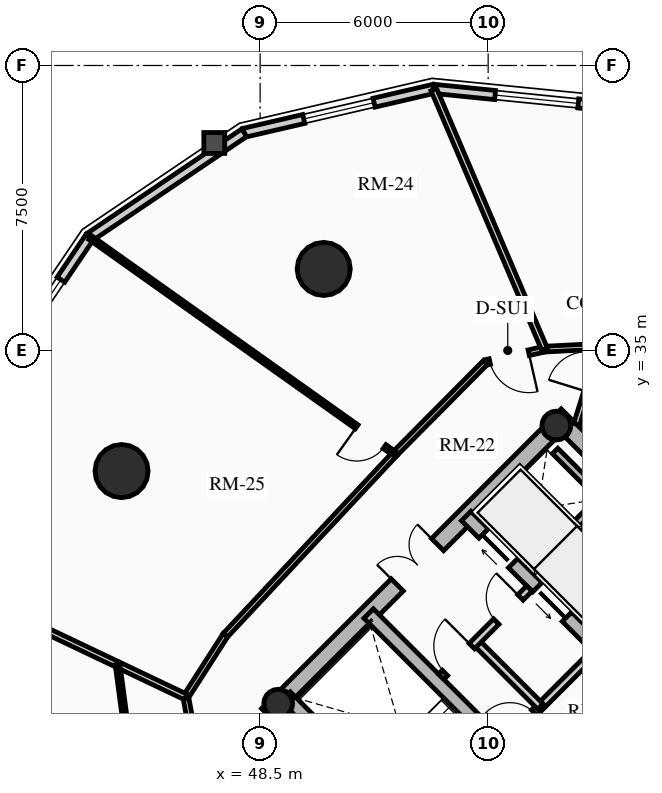
"""IFC4 building model, lengths in metres.
Left out: names, types, materials, properties, quantities, classifications, styles, units other than length and angle.
Written with IfcOpenShell. Run it as: python <this file> out.ifc"""

import sys

from ifc_helpers import new_model, si_unit, direction, frame, frame_2d, origin, origin_2d, place, context, subcontext, project, spatial, rectangle, circle, hollow_circle, extrude, source, transform, mapped, element, fill, save


model = new_model("IFC4")
c1 = context("Model", 3, precision=1e-05, world=origin(), true_north=direction((0.0, 1.0)))
c2 = subcontext(c1, "Body", "Model", "MODEL_VIEW")
j1 = project(units=[si_unit("LENGTHUNIT", "METRE"), si_unit("PLANEANGLEUNIT", "RADIAN")], contexts=[c1])
p1 = place(None, origin())
s1 = spatial("IfcSite", under=j1, at=p1, CompositionType="ELEMENT")
p2 = place(p1, origin())
s2 = spatial("IfcBuilding", under=s1, at=p2, CompositionType="ELEMENT")
p3 = place(p2, frame((0.0, 0.0, 116.71)))
s3 = spatial("IfcBuildingStorey", under=s2, at=p3, CompositionType="ELEMENT", Elevation=116.71)
for number, where, z_axis, x_axis in (
    (1, (58.737, 15.697, 0.0), (0.0, 0.0, 1.0), (-0.707, 0.707, 0.0)),
    (2, (66.303, 23.263, 0.0), (0.0, 0.0, 1.0), (-0.707, 0.707, 0.0)),
):
    element("IfcWall", number, at=place(p3, frame(where, z_axis=z_axis, x_axis=x_axis)), inside=s3, PredefinedType="SHEAR", context=c2, shape_type="SweptSolid", body=[
        extrude(rectangle(XDim=14.2, YDim=0.45, at=frame_2d((7.1, 0.0))), origin(), (0.0, 0.0, 1.0), 2.91),
    ])
p4 = place(p3, frame((48.856, 25.578, 0.0), z_axis=(0.0, 0.0, 1.0), x_axis=(0.707106781187, 0.707106781187, 0.0)))
e3 = element("IfcWall", 3, at=p4, inside=s3, PredefinedType="SHEAR", context=c2, shape_type="SweptSolid", body=[
    extrude(rectangle(XDim=10.7, YDim=0.45, at=frame_2d((5.35, 0.0))), origin(), (0.0, 0.0, 1.0), 2.91),
])
m1 = source(origin(), c2, "Body", "SweptSolid", [
    extrude(rectangle(XDim=1.5, YDim=2.02, at=frame_2d((0.75, 1.01))), frame((0.0, 0.235, 0.0), z_axis=(0.0, -1.0, 0.0), x_axis=(1.0, 0.0, 0.0)), (0.0, 0.0, 1.0), 0.47),
])
p5 = place(p4, frame((4.6, 0.0, 0.0)))
e4 = element("IfcOpeningElement", 4, at=p5, cuts=e3, PredefinedType="OPENING", context=c2, shape_type="MappedRepresentation", body=[
    mapped(m1, transform((0.0, 0.0, 0.0), x_axis=(1.0, 0.0, 0.0), y_axis=(0.0, 1.0, 0.0), z_axis=(0.0, 0.0, 1.0), scale=1.0)),
])
p6 = place(p3, frame((61.078, 18.355, 0.0), z_axis=(0.0, 0.0, 1.0), x_axis=(-0.707106781187, 0.707106781187, 0.0)))
e5 = element("IfcWall", 5, at=p6, inside=s3, PredefinedType="SHEAR", context=c2, shape_type="SweptSolid", body=[
    extrude(rectangle(XDim=13.75, YDim=0.35, at=frame_2d((6.875, 0.0))), origin(), (0.0, 0.0, 1.0), 2.91),
])
m2 = source(origin(), c2, "Body", "SweptSolid", [
    extrude(rectangle(XDim=1.1, YDim=2.015, at=frame_2d((0.55, 1.007))), frame((0.0, 0.185, 0.0), z_axis=(0.0, -1.0, 0.0), x_axis=(1.0, 0.0, 0.0)), (0.0, 0.0, 1.0), 0.37),
])
p7 = place(p6, frame((4.875, 0.0, 0.0)))
e6 = element("IfcOpeningElement", 6, at=p7, cuts=e5, PredefinedType="OPENING", context=c2, shape_type="MappedRepresentation", body=[
    mapped(m2, transform((0.0, 0.0, 0.0), x_axis=(1.0, 0.0, 0.0), y_axis=(0.0, 1.0, 0.0), z_axis=(0.0, 0.0, 1.0), scale=1.0)),
])
m3 = source(origin(), c2, "Body", "SweptSolid", [
    extrude(rectangle(XDim=1.15, YDim=2.02, at=frame_2d((0.575, 1.01))), frame((0.0, 0.185, 0.0), z_axis=(0.0, -1.0, 0.0), x_axis=(1.0, 0.0, 0.0)), (0.0, 0.0, 1.0), 0.37),
])
p8 = place(p6, frame((7.295, 0.0, 0.0)))
e7 = element("IfcOpeningElement", 7, at=p8, cuts=e5, PredefinedType="OPENING", context=c2, shape_type="MappedRepresentation", body=[
    mapped(m3, transform((0.0, 0.0, 0.0), x_axis=(1.0, 0.0, 0.0), y_axis=(0.0, 1.0, 0.0), z_axis=(0.0, 0.0, 1.0), scale=1.0)),
])
p9 = place(p3, frame((63.645, 20.922, 0.0), z_axis=(0.0, 0.0, 1.0), x_axis=(-0.707106781187, 0.707106781187, 0.0)))
e8 = element("IfcWall", 8, at=p9, inside=s3, PredefinedType="SHEAR", context=c2, shape_type="SweptSolid", body=[
    extrude(rectangle(XDim=13.75, YDim=0.35, at=frame_2d((6.875, 0.0))), origin(), (0.0, 0.0, 1.0), 2.91),
])
p10 = place(p9, frame((10.0, 0.0, 0.0)))
e9 = element("IfcOpeningElement", 9, at=p10, cuts=e8, PredefinedType="OPENING", context=c2, shape_type="MappedRepresentation", body=[
    mapped(m2, transform((0.0, 0.0, 0.0), x_axis=(1.0, 0.0, 0.0), y_axis=(0.0, 1.0, 0.0), z_axis=(0.0, 0.0, 1.0), scale=1.0)),
])
p11 = place(p9, frame((12.0, 0.0, 0.0)))
e10 = element("IfcOpeningElement", 10, at=p11, cuts=e8, PredefinedType="OPENING", context=c2, shape_type="MappedRepresentation", body=[
    mapped(m2, transform((0.0, 0.0, 0.0), x_axis=(1.0, 0.0, 0.0), y_axis=(0.0, 1.0, 0.0), z_axis=(0.0, 0.0, 1.0), scale=1.0)),
])
p12 = place(p9, frame((5.305, 0.0, 0.0)))
e11 = element("IfcOpeningElement", 11, at=p12, cuts=e8, PredefinedType="OPENING", context=c2, shape_type="MappedRepresentation", body=[
    mapped(m3, transform((0.0, 0.0, 0.0), x_axis=(1.0, 0.0, 0.0), y_axis=(0.0, 1.0, 0.0), z_axis=(0.0, 0.0, 1.0), scale=1.0)),
])
p13 = place(p3, frame((53.922, 21.141, 0.0), z_axis=(0.0, 0.0, 1.0), x_axis=(-0.707088616009, 0.707124945897, 0.0)))
e12 = element("IfcWall", 12, at=p13, inside=s3, PredefinedType="SHEAR", context=c2, shape_type="SweptSolid", body=[
    extrude(rectangle(XDim=6.72, YDim=0.35, at=frame_2d((3.36, 0.0))), origin(), (0.0, 0.0, 1.0), 2.91),
])
for number, where, z_axis, x_axis in (
    (13, (48.976, 25.706, 0.0), (0.0, 0.0, 1.0), (0.707, 0.707, 0.0)),
    (14, (56.294, 33.024, 0.0), (0.0, 0.0, 1.0), (0.707, 0.707, 0.0)),
):
    element("IfcColumn", number, at=place(p3, frame(where, z_axis=z_axis, x_axis=x_axis)), inside=s3, PredefinedType="COLUMN", context=c2, shape_type="SweptSolid", body=[
        extrude(hollow_circle(Radius=0.38, WallThickness=0.032, at=origin_2d()), origin(), (0.0, 0.0, 1.0), 2.91),
    ])
for number, where, z_axis, x_axis in (
    (15, (50.173, 37.146, 0.0), (0.0, 0.0, 1.0), (1.0, 0.0, 0.0)),
    (16, (44.854, 31.827, 0.0), (0.0, 0.0, 1.0), (1.0, 0.0, 0.0)),
):
    element("IfcColumn", number, at=place(p3, frame(where, z_axis=z_axis, x_axis=x_axis)), inside=s3, PredefinedType="USERDEFINED", context=c2, shape_type="SweptSolid", body=[
        extrude(circle(Radius=0.7, at=origin_2d()), origin(), (0.0, 0.0, 1.0), 2.91),
    ])
p14 = place(p3, frame((53.067, 41.885, 0.0), z_axis=(0.0, 0.0, 1.0), x_axis=(0.994971754311, -0.10015591906, 0.0)))
e17 = element("IfcWall", 17, at=p14, inside=s3, PredefinedType="SOLIDWALL", context=c2, shape_type="SweptSolid", body=[
    extrude(rectangle(XDim=5.448, YDim=0.24, at=frame_2d((2.724, 0.0))), origin(), (0.0, 0.0, 1.0), 2.179),
])
m4 = source(origin(), c2, "Body", "SweptSolid", [
    extrude(rectangle(XDim=2.2, YDim=1.35, at=frame_2d((1.1, 0.675))), frame((0.0, 0.13, 0.0), z_axis=(0.0, -1.0, 0.0), x_axis=(1.0, 0.0, 0.0)), (0.0, 0.0, 1.0), 0.26),
])
p15 = place(p14, frame((1.624, 0.0, 0.65)))
e18 = element("IfcOpeningElement", 18, at=p15, cuts=e17, PredefinedType="OPENING", context=c2, shape_type="MappedRepresentation", body=[
    mapped(m4, transform((0.0, 0.0, 0.0), x_axis=(1.0, 0.0, 0.0), y_axis=(0.0, 1.0, 0.0), z_axis=(0.0, 0.0, 1.0), scale=1.0)),
])
p16 = place(p3, frame((48.08, 40.729, 0.0), z_axis=(0.0, 0.0, 1.0), x_axis=(0.974165631126, 0.225834725257, 0.0)))
e19 = element("IfcWall", 19, at=p16, inside=s3, PredefinedType="SOLIDWALL", context=c2, shape_type="SweptSolid", body=[
    extrude(rectangle(XDim=5.119, YDim=0.24, at=frame_2d((2.56, 0.0))), origin(), (0.0, 0.0, 1.0), 2.179),
])
m5 = source(origin(), c2, "Body", "SweptSolid", [
    extrude(rectangle(XDim=1.9, YDim=1.35, at=frame_2d((0.95, 0.675))), frame((0.0, 0.13, 0.0), z_axis=(0.0, -1.0, 0.0), x_axis=(1.0, 0.0, 0.0)), (0.0, 0.0, 1.0), 0.26),
])
p17 = place(p16, frame((1.609, 0.0, 0.65)))
e20 = element("IfcOpeningElement", 20, at=p17, cuts=e19, PredefinedType="OPENING", context=c2, shape_type="MappedRepresentation", body=[
    mapped(m5, transform((0.0, 0.0, 0.0), x_axis=(1.0, 0.0, 0.0), y_axis=(0.0, 1.0, 0.0), z_axis=(0.0, 0.0, 1.0), scale=1.0)),
])
p18 = place(p3, frame((44.015, 37.985, 0.0), z_axis=(0.0, 0.0, 1.0), x_axis=(0.828781148131, 0.559572880421, 0.0)))
e21 = element("IfcWall", 21, at=p18, inside=s3, PredefinedType="SOLIDWALL", context=c2, shape_type="SweptSolid", body=[
    extrude(rectangle(XDim=4.905, YDim=0.24, at=frame_2d((2.452, 0.0))), origin(), (0.0, 0.0, 1.0), 2.179),
])
p19 = place(p3, frame((41.271, 33.92, 0.0), z_axis=(0.0, 0.0, 1.0), x_axis=(0.559572880421, 0.828781148131, 0.0)))
e22 = element("IfcWall", 22, at=p19, inside=s3, PredefinedType="SOLIDWALL", context=c2, shape_type="SweptSolid", body=[
    extrude(rectangle(XDim=4.905, YDim=0.24, at=frame_2d((2.452, 0.0))), origin(), (0.0, 0.0, 1.0), 2.179),
])
p20 = place(p19, frame((1.352, 0.0, 0.65)))
e23 = element("IfcOpeningElement", 23, at=p20, cuts=e22, PredefinedType="OPENING", context=c2, shape_type="MappedRepresentation", body=[
    mapped(m4, transform((0.0, 0.0, 0.0), x_axis=(1.0, 0.0, 0.0), y_axis=(0.0, 1.0, 0.0), z_axis=(0.0, 0.0, 1.0), scale=1.0)),
])
p21 = place(p3, frame((55.615, 29.227, 0.0), z_axis=(0.0, 0.0, 1.0), x_axis=(0.707147878904, 0.70706568108, 0.0)))
e24 = element("IfcWall", 24, at=p21, inside=s3, PredefinedType="SHEAR", context=c2, shape_type="SweptSolid", body=[
    extrude(rectangle(XDim=2.97, YDim=0.2, at=frame_2d((1.485, 0.0))), origin(), (0.0, 0.0, 1.0), 2.91),
])
p22 = place(p3, frame((57.419, 31.2, 0.0), z_axis=(0.0, 0.0, 1.0), x_axis=(-0.707032117043, 0.707181437447, 0.0)))
e25 = element("IfcWall", 25, at=p22, inside=s3, PredefinedType="SHEAR", context=c2, shape_type="SweptSolid", body=[
    extrude(rectangle(XDim=1.635, YDim=0.2, at=frame_2d((0.817, 0.0))), origin(), (0.0, 0.0, 1.0), 2.91),
])
p23 = place(p3, frame((54.961, 24.719, 0.0), z_axis=(0.0, 0.0, 1.0), x_axis=(0.707106781187, 0.707106781187, 0.0)))
e26 = element("IfcWall", 26, at=p23, inside=s3, PredefinedType="PARTITIONING", context=c2, shape_type="SweptSolid", body=[
    extrude(rectangle(XDim=3.28, YDim=0.2, at=frame_2d((1.64, 0.0))), origin(), (0.0, 0.0, 1.0), 2.655),
])
m6 = source(origin(), c2, "Body", "SweptSolid", [
    extrude(rectangle(XDim=0.9, YDim=2.005, at=frame_2d((0.45, 1.002))), frame((0.0, 0.11, 0.0), z_axis=(0.0, -1.0, 0.0), x_axis=(1.0, 0.0, 0.0)), (0.0, 0.0, 1.0), 0.22),
])
p24 = place(p23, frame((0.16, 0.0, 0.0)))
e27 = element("IfcOpeningElement", 27, at=p24, cuts=e26, PredefinedType="OPENING", context=c2, shape_type="MappedRepresentation", body=[
    mapped(m6, transform((0.0, 0.0, 0.0), x_axis=(1.0, 0.0, 0.0), y_axis=(0.0, 1.0, 0.0), z_axis=(0.0, 0.0, 1.0), scale=1.0)),
])
p25 = place(p3, frame((55.874, 25.631, 0.0), z_axis=(0.0, 0.0, 1.0), x_axis=(-0.707157639372, 0.707055919343, 0.0)))
e28 = element("IfcWall", 28, at=p25, inside=s3, PredefinedType="PARTITIONING", context=c2, shape_type="SweptSolid", body=[
    extrude(rectangle(XDim=2.4, YDim=0.2, at=frame_2d((1.2, 0.0))), origin(), (0.0, 0.0, 1.0), 2.655),
])
p26 = place(p3, frame((53.264, 26.416, 0.0), z_axis=(0.0, 0.0, 1.0), x_axis=(0.707106781187, 0.707106781187, 0.0)))
e29 = element("IfcWall", 29, at=p26, inside=s3, PredefinedType="PARTITIONING", context=c2, shape_type="SweptSolid", body=[
    extrude(rectangle(XDim=3.28, YDim=0.2, at=frame_2d((1.64, 0.0))), origin(), (0.0, 0.0, 1.0), 2.655),
])
m7 = source(origin(), c2, "Body", "SweptSolid", [
    extrude(rectangle(XDim=1.0, YDim=2.015, at=frame_2d((0.5, 1.007))), frame((0.0, 0.11, 0.0), z_axis=(0.0, -1.0, 0.0), x_axis=(1.0, 0.0, 0.0)), (0.0, 0.0, 1.0), 0.22),
])
p27 = place(p26, frame((0.14, 0.0, 0.0)))
e30 = element("IfcOpeningElement", 30, at=p27, cuts=e29, PredefinedType="OPENING", context=c2, shape_type="MappedRepresentation", body=[
    mapped(m7, transform((0.0, 0.0, 0.0), x_axis=(1.0, 0.0, 0.0), y_axis=(0.0, 1.0, 0.0), z_axis=(0.0, 0.0, 1.0), scale=1.0)),
])
p28 = place(p26, frame((2.05, 0.0, 0.0)))
e31 = element("IfcOpeningElement", 31, at=p28, cuts=e29, PredefinedType="OPENING", context=c2, shape_type="MappedRepresentation", body=[
    mapped(m6, transform((0.0, 0.0, 0.0), x_axis=(1.0, 0.0, 0.0), y_axis=(0.0, 1.0, 0.0), z_axis=(0.0, 0.0, 1.0), scale=1.0)),
])
p29 = place(p3, frame((57.467, 35.111, 0.0), z_axis=(0.0, 0.0, 1.0), x_axis=(-0.998691757323, -0.051134859488, 0.0)))
e32 = element("IfcWall", 32, at=p29, inside=s3, PredefinedType="PARTITIONING", context=c2, shape_type="SweptSolid", body=[
    extrude(rectangle(XDim=1.485, YDim=0.15, at=frame_2d((0.742, 0.0))), origin(), (0.0, 0.0, 1.0), 2.225),
])
p30 = place(p3, frame((55.984, 35.035, 0.0), z_axis=(0.0, 0.0, 1.0), x_axis=(-0.975290305708, -0.22092718165, 0.0)))
e33 = element("IfcWall", 33, at=p30, inside=s3, PredefinedType="PARTITIONING", context=c2, shape_type="SweptSolid", body=[
    extrude(rectangle(XDim=1.597, YDim=0.15, at=frame_2d((0.798, 0.0))), origin(), (0.0, 0.0, 1.0), 2.225),
])
m8 = source(origin(), c2, "Body", "SweptSolid", [
    extrude(rectangle(XDim=1.05, YDim=2.015, at=frame_2d((0.525, 1.007))), frame((0.0, 0.085, 0.0), z_axis=(0.0, -1.0, 0.0), x_axis=(1.0, 0.0, 0.0)), (0.0, 0.0, 1.0), 0.17),
])
p31 = place(p30, frame((0.427, 0.0, 0.0)))
e34 = element("IfcOpeningElement", 34, at=p31, cuts=e33, PredefinedType="OPENING", context=c2, shape_type="MappedRepresentation", body=[
    mapped(m8, transform((0.0, 0.0, 0.0), x_axis=(1.0, 0.0, 0.0), y_axis=(0.0, 1.0, 0.0), z_axis=(0.0, 0.0, 1.0), scale=1.0)),
])
p32 = place(p3, frame((54.427, 34.683, 0.0), z_axis=(0.0, 0.0, 1.0), x_axis=(-0.704178989986, -0.710022499687, 0.0)))
e35 = element("IfcWall", 35, at=p32, inside=s3, PredefinedType="PARTITIONING", context=c2, shape_type="SweptSolid", body=[
    extrude(rectangle(XDim=3.384, YDim=0.15, at=frame_2d((1.692, 0.0))), origin(), (0.0, 0.0, 1.0), 2.225),
])
p33 = place(p3, frame((52.043, 32.28, 0.0), z_axis=(0.0, 0.0, 1.0), x_axis=(-0.682606081633, -0.730786519661, 0.0)))
e36 = element("IfcWall", 36, at=p33, inside=s3, PredefinedType="PARTITIONING", context=c2, shape_type="SweptSolid", body=[
    extrude(rectangle(XDim=6.527, YDim=0.15, at=frame_2d((3.263, 0.0))), origin(), (0.0, 0.0, 1.0), 2.225),
])
p34 = place(p3, frame((47.588, 27.51, 0.0), z_axis=(0.0, 0.0, 1.0), x_axis=(-0.540202619347, -0.841534984449, 0.0)))
e37 = element("IfcWall", 37, at=p34, inside=s3, PredefinedType="PARTITIONING", context=c2, shape_type="SweptSolid", body=[
    extrude(rectangle(XDim=1.935, YDim=0.15, at=frame_2d((0.967, 0.0))), origin(), (0.0, 0.0, 1.0), 2.225),
])
p35 = place(p3, frame((46.543, 25.882, 0.0), z_axis=(0.0, 0.0, 1.0), x_axis=(0.181153502579, -0.983454832976, 0.0)))
e38 = element("IfcWall", 38, at=p35, inside=s3, PredefinedType="PARTITIONING", context=c2, shape_type="SweptSolid", body=[
    extrude(rectangle(XDim=1.392, YDim=0.15, at=frame_2d((0.696, 0.0))), origin(), (0.0, 0.0, 1.0), 2.225),
])
p36 = place(p3, frame((55.984, 35.035, 0.0), z_axis=(0.0, 0.0, 1.0), x_axis=(-0.392438685048, 0.919778168081, 0.0)))
e39 = element("IfcWall", 39, at=p36, inside=s3, PredefinedType="PARTITIONING", context=c2, shape_type="SweptSolid", body=[
    extrude(rectangle(XDim=7.426, YDim=0.16, at=frame_2d((3.713, 0.0))), origin(), (0.0, 0.0, 1.0), 2.179),
])
p37 = place(p3, frame((46.543, 25.882, 0.0), z_axis=(0.0, 0.0, 1.0), x_axis=(-0.903054383171, 0.429526228576, 0.0)))
e40 = element("IfcWall", 40, at=p37, inside=s3, PredefinedType="PARTITIONING", context=c2, shape_type="SweptSolid", body=[
    extrude(rectangle(XDim=7.096, YDim=0.16, at=frame_2d((3.548, 0.0))), origin(), (0.0, 0.0, 1.0), 2.179),
])
p38 = place(p3, frame((56.828, 33.056, 0.0), z_axis=(0.0, 0.0, 1.0), x_axis=(0.296730996083, 0.954961107042, 0.0)))
e41 = element("IfcWall", 41, at=p38, inside=s3, PredefinedType="PARTITIONING", context=c2, shape_type="SweptSolid", body=[
    extrude(rectangle(XDim=2.152, YDim=0.16, at=frame_2d((1.076, 0.0))), origin(), (0.0, 0.0, 1.0), 2.225),
])
m9 = source(origin(), c2, "Body", "SweptSolid", [
    extrude(rectangle(XDim=1.05, YDim=2.015, at=frame_2d((0.525, 1.007))), frame((0.0, 0.09, 0.0), z_axis=(0.0, -1.0, 0.0), x_axis=(1.0, 0.0, 0.0)), (0.0, 0.0, 1.0), 0.18),
])
p39 = place(p38, frame((0.902, 0.0, 0.0)))
e42 = element("IfcOpeningElement", 42, at=p39, cuts=e41, PredefinedType="OPENING", context=c2, shape_type="MappedRepresentation", body=[
    mapped(m9, transform((0.0, 0.0, 0.0), x_axis=(1.0, 0.0, 0.0), y_axis=(0.0, 1.0, 0.0), z_axis=(0.0, 0.0, 1.0), scale=1.0)),
])
p40 = place(p3, frame((52.043, 32.28, 0.0), z_axis=(0.0, 0.0, 1.0), x_axis=(-0.81534487613, 0.578975589268, 0.0)))
e43 = element("IfcWall", 43, at=p40, inside=s3, PredefinedType="PARTITIONING", context=c2, shape_type="SweptSolid", body=[
    extrude(rectangle(XDim=9.829, YDim=0.125, at=frame_2d((4.915, 0.0))), origin(), (0.0, 0.0, 1.0), 2.179),
])
m10 = source(origin(), c2, "Body", "SweptSolid", [
    extrude(rectangle(XDim=0.9, YDim=2.005, at=frame_2d((0.45, 1.002))), frame((0.0, 0.073, 0.0), z_axis=(0.0, -1.0, 0.0), x_axis=(1.0, 0.0, 0.0)), (0.0, 0.0, 1.0), 0.145),
])
p41 = place(p40, frame((0.33, 0.0, 0.0)))
e44 = element("IfcOpeningElement", 44, at=p41, cuts=e43, PredefinedType="OPENING", context=c2, shape_type="MappedRepresentation", body=[
    mapped(m10, transform((0.0, 0.0, 0.0), x_axis=(1.0, 0.0, 0.0), y_axis=(0.0, 1.0, 0.0), z_axis=(0.0, 0.0, 1.0), scale=1.0)),
])
p42 = place(p3, frame((44.749, 26.736, 0.0), z_axis=(0.0, 0.0, 1.0), x_axis=(0.132518524874, -0.991180528746, 0.0)))
e45 = element("IfcWall", 45, at=p42, inside=s3, PredefinedType="PARTITIONING", context=c2, shape_type="SweptSolid", body=[
    extrude(rectangle(XDim=2.524, YDim=0.125, at=frame_2d((1.262, 0.0))), origin(), (0.0, 0.0, 1.0), 2.179),
])
m11 = source(origin(), c2, "Body", "SweptSolid", [
    extrude(rectangle(XDim=2.2, YDim=1.35, at=frame_2d((1.1, 0.675))), frame((0.0, 0.03, 0.0), z_axis=(0.0, -1.0, 0.0), x_axis=(1.0, 0.0, 0.0)), (0.0, 0.0, 1.0), 0.06),
])
p43 = place(p15, origin())
e46 = element("IfcWindow", 46, at=p43, inside=s3, PartitioningType="DOUBLE_PANEL_VERTICAL", PredefinedType="WINDOW", context=c2, shape_type="MappedRepresentation", body=[
    mapped(m11, transform((0.0, 0.0, 0.0), x_axis=(1.0, 0.0, 0.0), y_axis=(0.0, 1.0, 0.0), z_axis=(0.0, 0.0, 1.0), scale=1.0)),
])
fill(e18, e46)
m12 = source(origin(), c2, "Body", "SweptSolid", [
    extrude(rectangle(XDim=1.9, YDim=1.35, at=frame_2d((0.95, 0.675))), frame((0.0, 0.03, 0.0), z_axis=(0.0, -1.0, 0.0), x_axis=(1.0, 0.0, 0.0)), (0.0, 0.0, 1.0), 0.06),
])
p44 = place(p17, origin())
e47 = element("IfcWindow", 47, at=p44, inside=s3, PartitioningType="DOUBLE_PANEL_VERTICAL", PredefinedType="WINDOW", context=c2, shape_type="MappedRepresentation", body=[
    mapped(m12, transform((0.0, 0.0, 0.0), x_axis=(1.0, 0.0, 0.0), y_axis=(0.0, 1.0, 0.0), z_axis=(0.0, 0.0, 1.0), scale=1.0)),
])
fill(e20, e47)
p45 = place(p20, origin())
e48 = element("IfcWindow", 48, at=p45, inside=s3, PartitioningType="DOUBLE_PANEL_VERTICAL", PredefinedType="WINDOW", context=c2, shape_type="MappedRepresentation", body=[
    mapped(m11, transform((0.0, 0.0, 0.0), x_axis=(1.0, 0.0, 0.0), y_axis=(0.0, 1.0, 0.0), z_axis=(0.0, 0.0, 1.0), scale=1.0)),
])
fill(e23, e48)
m13 = source(origin(), c2, "Body", "SweptSolid", [
    extrude(rectangle(XDim=1.1, YDim=2.015, at=frame_2d((0.55, 1.007))), frame((0.0, 0.025, 0.0), z_axis=(0.0, -1.0, 0.0), x_axis=(1.0, 0.0, 0.0)), (0.0, 0.0, 1.0), 0.05),
])
p46 = place(p10, origin())
e49 = element("IfcDoor", 49, at=p46, inside=s3, OperationType="SLIDING_TO_LEFT", PredefinedType="DOOR", context=c2, shape_type="MappedRepresentation", body=[
    mapped(m13, transform((0.0, 0.0, 0.0), x_axis=(1.0, 0.0, 0.0), y_axis=(0.0, 1.0, 0.0), z_axis=(0.0, 0.0, 1.0), scale=1.0)),
])
fill(e9, e49)
p47 = place(p11, origin())
e50 = element("IfcDoor", 50, at=p47, inside=s3, OperationType="SLIDING_TO_RIGHT", PredefinedType="DOOR", context=c2, shape_type="MappedRepresentation", body=[
    mapped(m13, transform((0.0, 0.0, 0.0), x_axis=(1.0, 0.0, 0.0), y_axis=(0.0, 1.0, 0.0), z_axis=(0.0, 0.0, 1.0), scale=1.0)),
])
fill(e10, e50)
m14 = source(origin(), c2, "Body", "SweptSolid", [
    extrude(rectangle(XDim=1.5, YDim=2.02, at=frame_2d((0.75, 1.01))), frame((0.0, 0.025, 0.0), z_axis=(0.0, -1.0, 0.0), x_axis=(1.0, 0.0, 0.0)), (0.0, 0.0, 1.0), 0.05),
])
p48 = place(p5, origin())
e51 = element("IfcDoor", 51, at=p48, inside=s3, OperationType="DOUBLE_DOOR_SINGLE_SWING", PredefinedType="DOOR", context=c2, shape_type="MappedRepresentation", body=[
    mapped(m14, transform((0.0, 0.0, 0.0), x_axis=(1.0, 0.0, 0.0), y_axis=(0.0, 1.0, 0.0), z_axis=(0.0, 0.0, 1.0), scale=1.0)),
])
fill(e4, e51)
m15 = source(origin(), c2, "Body", "SweptSolid", [
    extrude(rectangle(XDim=0.9, YDim=2.005, at=frame_2d((0.45, 1.002))), frame((0.0, 0.025, 0.0), z_axis=(0.0, -1.0, 0.0), x_axis=(1.0, 0.0, 0.0)), (0.0, 0.0, 1.0), 0.05),
])
p49 = place(p24, origin())
e52 = element("IfcDoor", 52, at=p49, inside=s3, OperationType="SINGLE_SWING_LEFT", PredefinedType="DOOR", context=c2, shape_type="MappedRepresentation", body=[
    mapped(m15, transform((0.0, 0.0, 0.0), x_axis=(1.0, 0.0, 0.0), y_axis=(0.0, 1.0, 0.0), z_axis=(0.0, 0.0, 1.0), scale=1.0)),
])
fill(e27, e52)
m16 = source(origin(), c2, "Body", "SweptSolid", [
    extrude(rectangle(XDim=1.0, YDim=2.015, at=frame_2d((0.5, 1.007))), frame((0.0, 0.025, 0.0), z_axis=(0.0, -1.0, 0.0), x_axis=(1.0, 0.0, 0.0)), (0.0, 0.0, 1.0), 0.05),
])
p50 = place(p27, origin())
e53 = element("IfcDoor", 53, at=p50, inside=s3, OperationType="SINGLE_SWING_RIGHT", PredefinedType="DOOR", context=c2, shape_type="MappedRepresentation", body=[
    mapped(m16, transform((0.0, 0.0, 0.0), x_axis=(1.0, 0.0, 0.0), y_axis=(0.0, 1.0, 0.0), z_axis=(0.0, 0.0, 1.0), scale=1.0)),
])
fill(e30, e53)
p51 = place(p28, origin())
e54 = element("IfcDoor", 54, at=p51, inside=s3, OperationType="SINGLE_SWING_RIGHT", PredefinedType="DOOR", context=c2, shape_type="MappedRepresentation", body=[
    mapped(m15, transform((0.0, 0.0, 0.0), x_axis=(1.0, 0.0, 0.0), y_axis=(0.0, 1.0, 0.0), z_axis=(0.0, 0.0, 1.0), scale=1.0)),
])
fill(e31, e54)
m17 = source(origin(), c2, "Body", "SweptSolid", [
    extrude(rectangle(XDim=1.05, YDim=2.015, at=frame_2d((0.525, 1.007))), frame((0.0, 0.025, 0.0), z_axis=(0.0, -1.0, 0.0), x_axis=(1.0, 0.0, 0.0)), (0.0, 0.0, 1.0), 0.05),
])
p52 = place(p31, origin())
e55 = element("IfcDoor", 55, at=p52, inside=s3, OperationType="SINGLE_SWING_LEFT", PredefinedType="DOOR", context=c2, shape_type="MappedRepresentation", body=[
    mapped(m17, transform((0.0, 0.0, 0.0), x_axis=(1.0, 0.0, 0.0), y_axis=(0.0, 1.0, 0.0), z_axis=(0.0, 0.0, 1.0), scale=1.0)),
])
fill(e34, e55)
p53 = place(p41, origin())
e56 = element("IfcDoor", 56, at=p53, inside=s3, OperationType="SINGLE_SWING_RIGHT", PredefinedType="DOOR", context=c2, shape_type="MappedRepresentation", body=[
    mapped(m15, transform((0.0, 0.0, 0.0), x_axis=(1.0, 0.0, 0.0), y_axis=(0.0, 1.0, 0.0), z_axis=(0.0, 0.0, 1.0), scale=1.0)),
])
fill(e44, e56)
save(model, sys.argv[1])
